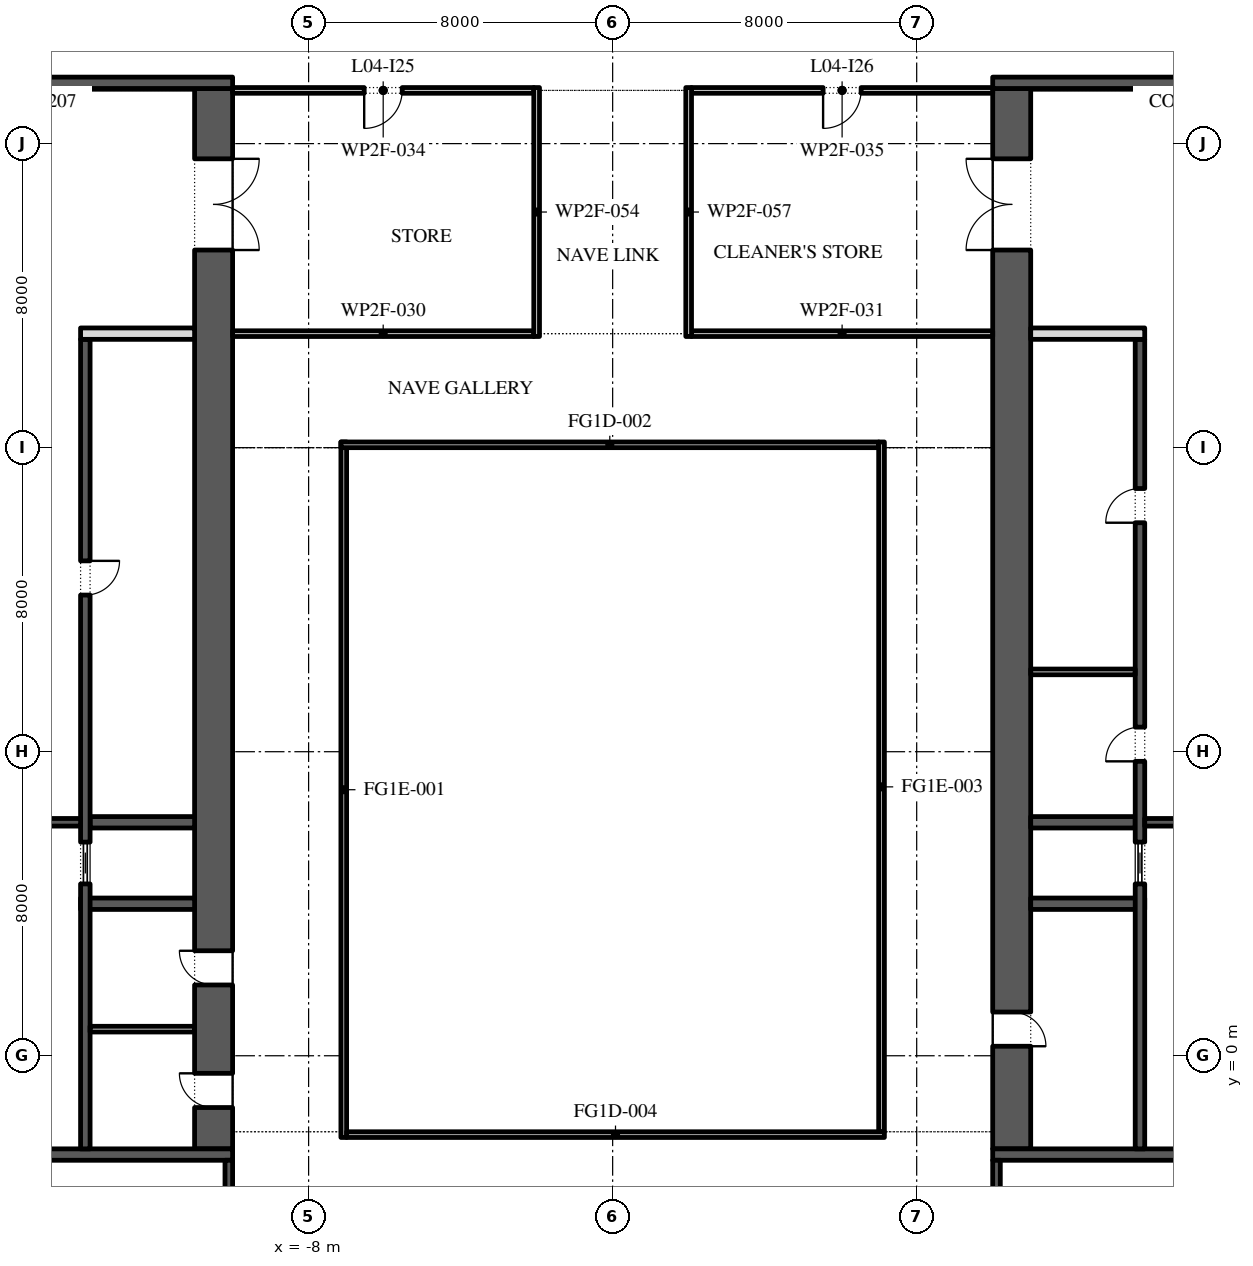
"""IFC4 building model, lengths in metres.
Left out: names, types, materials, properties, quantities, classifications, styles, units other than length and angle.
Written with IfcOpenShell. Run it as: python <this file> out.ifc"""

import sys

from ifc_helpers import new_model, si_unit, direction, frame, frame_2d, origin, place, context, subcontext, project, spatial, rectangle, extrude, element, fill, save


model = new_model("IFC4")
c1 = context("Model", 3, precision=1e-05, world=origin(), true_north=direction((0.0, 1.0)))
c2 = subcontext(c1, "Body", "Model", "MODEL_VIEW")
j1 = project(units=[si_unit("LENGTHUNIT", "METRE"), si_unit("PLANEANGLEUNIT", "RADIAN")], contexts=[c1])
p1 = place(None, origin())
s1 = spatial("IfcSite", under=j1, at=p1, CompositionType="ELEMENT")
p2 = place(p1, origin())
s2 = spatial("IfcBuilding", under=s1, at=p2, CompositionType="ELEMENT")
p3 = place(p2, frame((0.0, 0.0, 24.0)))
s3 = spatial("IfcBuildingStorey", under=s2, at=p3, CompositionType="ELEMENT", Elevation=24.0)
p4 = place(p3, frame((-7.075, -2.15, 0.0), z_axis=(0.0, 0.0, 1.0), x_axis=(0.0, 1.0, 0.0)))
e1 = element("IfcWall", 1, at=p4, inside=s3, PredefinedType="STANDARD", context=c2, shape_type="SweptSolid", body=[
    extrude(rectangle(XDim=18.3, YDim=0.15, at=frame_2d((9.15, 0.0))), origin(), (0.0, 0.0, 1.0), 4.5),
])
p5 = place(p3, frame((-7.15, 16.075, 0.0), z_axis=(0.0, 0.0, 1.0), x_axis=(1.0, 0.0, 0.0)))
e2 = element("IfcWall", 2, at=p5, inside=s3, PredefinedType="STANDARD", context=c2, shape_type="SweptSolid", body=[
    extrude(rectangle(XDim=14.15, YDim=0.15, at=frame_2d((7.075, 0.0))), origin(), (0.0, 0.0, 1.0), 3.52),
])
p6 = place(p3, frame((7.075, 16.15, 0.0), z_axis=(0.0, 0.0, 1.0), x_axis=(0.0, -1.0, 0.0)))
e3 = element("IfcWall", 3, at=p6, inside=s3, PredefinedType="STANDARD", context=c2, shape_type="SweptSolid", body=[
    extrude(rectangle(XDim=18.15, YDim=0.15, at=frame_2d((9.075, 0.0))), origin(), (0.0, 0.0, 1.0), 4.5),
])
p7 = place(p3, frame((7.15, -2.075, 0.0), z_axis=(0.0, 0.0, 1.0), x_axis=(-1.0, 0.0, 0.0)))
e4 = element("IfcWall", 4, at=p7, inside=s3, PredefinedType="STANDARD", context=c2, shape_type="SweptSolid", body=[
    extrude(rectangle(XDim=14.15, YDim=0.15, at=frame_2d((7.075, 0.0))), origin(), (0.0, 0.0, 1.0), 3.52),
])
p8 = place(p3, frame((-10.5, -2.45, 0.0), z_axis=(0.0, 0.0, 1.0), x_axis=(0.0, 1.0, 0.0)))
e5 = element("IfcWall", 5, at=p8, inside=s3, PredefinedType="SHEAR", context=c2, shape_type="SweptSolid", body=[
    extrude(rectangle(XDim=27.9, YDim=1.0, at=frame_2d((13.95, 0.0))), origin(), (0.0, 0.0, 1.0), 4.5),
])
p9 = place(p8, frame((23.65, 0.0, 0.0)))
e6 = element("IfcOpeningElement", 6, at=p9, cuts=e5, PredefinedType="OPENING", context=c2, shape_type="SweptSolid", body=[
    extrude(rectangle(XDim=2.4, YDim=2.1, at=frame_2d((1.2, 1.05))), frame((0.0, 0.51, 0.0), z_axis=(0.0, -1.0, 0.0), x_axis=(1.0, 0.0, 0.0)), (0.0, 0.0, 1.0), 1.02),
])
p10 = place(p8, frame((1.087, 0.0, 0.0)))
e7 = element("IfcOpeningElement", 7, at=p10, cuts=e5, PredefinedType="OPENING", context=c2, shape_type="SweptSolid", body=[
    extrude(rectangle(XDim=0.9, YDim=2.1, at=frame_2d((0.45, 1.05))), frame((0.0, 0.51, 0.0), z_axis=(0.0, -1.0, 0.0), x_axis=(1.0, 0.0, 0.0)), (0.0, 0.0, 1.0), 1.02),
])
p11 = place(p8, frame((4.312, 0.0, 0.0)))
e8 = element("IfcOpeningElement", 8, at=p11, cuts=e5, PredefinedType="OPENING", context=c2, shape_type="SweptSolid", body=[
    extrude(rectangle(XDim=0.9, YDim=2.1, at=frame_2d((0.45, 1.05))), frame((0.0, 0.51, 0.0), z_axis=(0.0, -1.0, 0.0), x_axis=(1.0, 0.0, 0.0)), (0.0, 0.0, 1.0), 1.02),
])
for number, where, z_axis, x_axis in (
    (9, (-22.0, -2.6, 0.0), (0.0, 0.0, 1.0), (1.0, 0.0, 0.0)),
    (10, (-22.0, 25.6, 0.0), (0.0, 0.0, 1.0), (1.0, 0.0, 0.0)),
):
    element("IfcWall", number, at=place(p3, frame(where, z_axis=z_axis, x_axis=x_axis)), inside=s3, PredefinedType="SHEAR", context=c2, shape_type="SweptSolid", body=[
        extrude(rectangle(XDim=12.0, YDim=0.3, at=frame_2d((6.0, 0.0))), origin(), (0.0, 0.0, 1.0), 4.5),
    ])
p12 = place(p3, frame((-14.0, 4.0, 0.0), z_axis=(0.0, 0.0, 1.0), x_axis=(1.0, 0.0, 0.0)))
e11 = element("IfcWall", 11, at=p12, inside=s3, PredefinedType="SHEAR", context=c2, shape_type="SweptSolid", body=[
    extrude(rectangle(XDim=3.0, YDim=0.3, at=frame_2d((1.5, 0.0))), origin(), (0.0, 0.0, 1.0), 4.5),
])
p13 = place(p3, frame((-13.75, 6.143, 0.0), z_axis=(0.0, 0.0, 1.0), x_axis=(1.0, 0.0, 0.0)))
e12 = element("IfcWall", 12, at=p13, inside=s3, PredefinedType="SHEAR", context=c2, shape_type="SweptSolid", body=[
    extrude(rectangle(XDim=2.75, YDim=0.3, at=frame_2d((1.375, 0.0))), origin(), (0.0, 0.0, 1.0), 4.5),
])
p14 = place(p3, frame((-13.875, -2.45, 0.0), z_axis=(0.0, 0.0, 1.0), x_axis=(0.0, 1.0, 0.0)))
e13 = element("IfcWall", 13, at=p14, inside=s3, PredefinedType="SHEAR", context=c2, shape_type="SweptSolid", body=[
    extrude(rectangle(XDim=21.3, YDim=0.25, at=frame_2d((10.65, 0.0))), origin(), (0.0, 0.0, 1.0), 4.5),
])
p15 = place(p14, frame((14.571, 0.0, 0.0)))
e14 = element("IfcOpeningElement", 14, at=p15, cuts=e13, PredefinedType="OPENING", context=c2, shape_type="SweptSolid", body=[
    extrude(rectangle(XDim=0.9, YDim=2.1, at=frame_2d((0.45, 1.05))), frame((0.0, 0.135, 0.0), z_axis=(0.0, -1.0, 0.0), x_axis=(1.0, 0.0, 0.0)), (0.0, 0.0, 1.0), 0.27),
])
p16 = place(p14, frame((6.971, 0.0, 0.0)))
e15 = element("IfcOpeningElement", 15, at=p16, cuts=e13, PredefinedType="OPENING", context=c2, shape_type="SweptSolid", body=[
    extrude(rectangle(XDim=1.1, YDim=2.1, at=frame_2d((0.55, 1.05))), frame((0.0, 0.135, 0.0), z_axis=(0.0, -1.0, 0.0), x_axis=(1.0, 0.0, 0.0)), (0.0, 0.0, 1.0), 0.27),
])
p17 = place(p3, frame((-14.0, 19.0, 0.0), z_axis=(0.0, 0.0, 1.0), x_axis=(1.0, 0.0, 0.0)))
e16 = element("IfcWall", 16, at=p17, inside=s3, PredefinedType="PARTITIONING", context=c2, shape_type="SweptSolid", body=[
    extrude(rectangle(XDim=3.0, YDim=0.3, at=frame_2d((1.5, 0.0))), origin(), (0.0, 0.0, 1.0), 4.5),
])
p18 = place(p3, frame((-18.0, 6.143, 0.0), z_axis=(0.0, 0.0, 1.0), x_axis=(1.0, 0.0, 0.0)))
e17 = element("IfcWall", 17, at=p18, inside=s3, PredefinedType="SHEAR", context=c2, shape_type="SweptSolid", body=[
    extrude(rectangle(XDim=4.0, YDim=0.2, at=frame_2d((2.0, 0.0))), origin(), (0.0, 0.0, 1.0), 4.5),
])
p19 = place(p18, frame((1.4, 0.0, 0.0)))
e18 = element("IfcOpeningElement", 18, at=p19, cuts=e17, PredefinedType="OPENING", context=c2, shape_type="SweptSolid", body=[
    extrude(rectangle(XDim=1.2, YDim=2.1, at=frame_2d((0.6, 1.05))), frame((0.0, 0.11, 0.0), z_axis=(0.0, -1.0, 0.0), x_axis=(1.0, 0.0, 0.0)), (0.0, 0.0, 1.0), 0.22),
])
p20 = place(p3, frame((-13.75, 0.7, 0.0), z_axis=(0.0, 0.0, 1.0), x_axis=(1.0, 0.0, 0.0)))
e19 = element("IfcWall", 19, at=p20, inside=s3, PredefinedType="PARTITIONING", context=c2, shape_type="SweptSolid", body=[
    extrude(rectangle(XDim=2.75, YDim=0.15, at=frame_2d((1.375, 0.0))), origin(), (0.0, 0.0, 1.0), 4.5),
])
p21 = place(p3, frame((-10.1, -15.8, 0.0), z_axis=(0.0, 0.0, 1.0), x_axis=(0.0, 1.0, 0.0)))
e20 = element("IfcWall", 20, at=p21, inside=s3, PredefinedType="SHEAR", context=c2, shape_type="SweptSolid", body=[
    extrude(rectangle(XDim=13.05, YDim=0.2, at=frame_2d((6.525, 0.0))), origin(), (0.0, 0.0, 1.0), 4.5),
])
p22 = place(p21, frame((2.762, 0.0, 0.0)))
e21 = element("IfcOpeningElement", 21, at=p22, cuts=e20, PredefinedType="OPENING", context=c2, shape_type="SweptSolid", body=[
    extrude(rectangle(XDim=0.9, YDim=2.1, at=frame_2d((0.45, 1.05))), frame((0.0, 0.11, 0.0), z_axis=(0.0, -1.0, 0.0), x_axis=(1.0, 0.0, 0.0)), (0.0, 0.0, 1.0), 0.22),
])
p23 = place(p21, frame((9.363, 0.0, 0.0)))
e22 = element("IfcOpeningElement", 22, at=p23, cuts=e20, PredefinedType="OPENING", context=c2, shape_type="SweptSolid", body=[
    extrude(rectangle(XDim=0.9, YDim=2.1, at=frame_2d((0.45, 1.05))), frame((0.0, 0.11, 0.0), z_axis=(0.0, -1.0, 0.0), x_axis=(1.0, 0.0, 0.0)), (0.0, 0.0, 1.0), 0.22),
])
p24 = place(p3, frame((10.5, -2.45, 0.0), z_axis=(0.0, 0.0, 1.0), x_axis=(0.0, 1.0, 0.0)))
e23 = element("IfcWall", 23, at=p24, inside=s3, PredefinedType="SHEAR", context=c2, shape_type="SweptSolid", body=[
    extrude(rectangle(XDim=27.9, YDim=1.0, at=frame_2d((13.95, 0.0))), origin(), (0.0, 0.0, 1.0), 4.5),
])
p25 = place(p24, frame((23.65, 0.0, 0.0)))
e24 = element("IfcOpeningElement", 24, at=p25, cuts=e23, PredefinedType="OPENING", context=c2, shape_type="SweptSolid", body=[
    extrude(rectangle(XDim=2.4, YDim=2.1, at=frame_2d((1.2, 1.05))), frame((0.0, 0.51, 0.0), z_axis=(0.0, -1.0, 0.0), x_axis=(1.0, 0.0, 0.0)), (0.0, 0.0, 1.0), 1.02),
])
p26 = place(p24, frame((2.7, 0.0, 0.0)))
e25 = element("IfcOpeningElement", 25, at=p26, cuts=e23, PredefinedType="OPENING", context=c2, shape_type="SweptSolid", body=[
    extrude(rectangle(XDim=0.9, YDim=2.1, at=frame_2d((0.45, 1.05))), frame((0.0, 0.51, 0.0), z_axis=(0.0, -1.0, 0.0), x_axis=(1.0, 0.0, 0.0)), (0.0, 0.0, 1.0), 1.02),
])
for number, where, z_axis, x_axis in (
    (26, (10.0, -2.6, 0.0), (0.0, 0.0, 1.0), (1.0, 0.0, 0.0)),
    (27, (10.0, 25.6, 0.0), (0.0, 0.0, 1.0), (1.0, 0.0, 0.0)),
):
    element("IfcWall", number, at=place(p3, frame(where, z_axis=z_axis, x_axis=x_axis)), inside=s3, PredefinedType="SHEAR", context=c2, shape_type="SweptSolid", body=[
        extrude(rectangle(XDim=12.0, YDim=0.3, at=frame_2d((6.0, 0.0))), origin(), (0.0, 0.0, 1.0), 4.5),
    ])
p27 = place(p3, frame((11.0, 4.0, 0.0), z_axis=(0.0, 0.0, 1.0), x_axis=(1.0, 0.0, 0.0)))
e28 = element("IfcWall", 28, at=p27, inside=s3, PredefinedType="SHEAR", context=c2, shape_type="SweptSolid", body=[
    extrude(rectangle(XDim=3.0, YDim=0.3, at=frame_2d((1.5, 0.0))), origin(), (0.0, 0.0, 1.0), 4.5),
])
p28 = place(p3, frame((11.0, 6.143, 0.0), z_axis=(0.0, 0.0, 1.0), x_axis=(1.0, 0.0, 0.0)))
e29 = element("IfcWall", 29, at=p28, inside=s3, PredefinedType="SHEAR", context=c2, shape_type="SweptSolid", body=[
    extrude(rectangle(XDim=2.75, YDim=0.3, at=frame_2d((1.375, 0.0))), origin(), (0.0, 0.0, 1.0), 4.5),
])
p29 = place(p3, frame((13.875, -2.45, 0.0), z_axis=(0.0, 0.0, 1.0), x_axis=(0.0, 1.0, 0.0)))
e30 = element("IfcWall", 30, at=p29, inside=s3, PredefinedType="SHEAR", context=c2, shape_type="SweptSolid", body=[
    extrude(rectangle(XDim=21.3, YDim=0.25, at=frame_2d((10.65, 0.0))), origin(), (0.0, 0.0, 1.0), 4.5),
])
p30 = place(p29, frame((10.196, 0.0, 0.0)))
e31 = element("IfcOpeningElement", 31, at=p30, cuts=e30, PredefinedType="OPENING", context=c2, shape_type="SweptSolid", body=[
    extrude(rectangle(XDim=0.9, YDim=2.1, at=frame_2d((0.45, 1.05))), frame((0.0, 0.135, 0.0), z_axis=(0.0, -1.0, 0.0), x_axis=(1.0, 0.0, 0.0)), (0.0, 0.0, 1.0), 0.27),
])
p31 = place(p29, frame((16.475, 0.0, 0.0)))
e32 = element("IfcOpeningElement", 32, at=p31, cuts=e30, PredefinedType="OPENING", context=c2, shape_type="SweptSolid", body=[
    extrude(rectangle(XDim=0.9, YDim=2.1, at=frame_2d((0.45, 1.05))), frame((0.0, 0.135, 0.0), z_axis=(0.0, -1.0, 0.0), x_axis=(1.0, 0.0, 0.0)), (0.0, 0.0, 1.0), 0.27),
])
p32 = place(p29, frame((6.971, 0.0, 0.0)))
e33 = element("IfcOpeningElement", 33, at=p32, cuts=e30, PredefinedType="OPENING", context=c2, shape_type="SweptSolid", body=[
    extrude(rectangle(XDim=1.1, YDim=2.1, at=frame_2d((0.55, 1.05))), frame((0.0, 0.135, 0.0), z_axis=(0.0, -1.0, 0.0), x_axis=(1.0, 0.0, 0.0)), (0.0, 0.0, 1.0), 0.27),
])
p33 = place(p3, frame((11.0, 19.0, 0.0), z_axis=(0.0, 0.0, 1.0), x_axis=(1.0, 0.0, 0.0)))
e34 = element("IfcWall", 34, at=p33, inside=s3, PredefinedType="PARTITIONING", context=c2, shape_type="SweptSolid", body=[
    extrude(rectangle(XDim=3.0, YDim=0.3, at=frame_2d((1.5, 0.0))), origin(), (0.0, 0.0, 1.0), 4.5),
])
p34 = place(p3, frame((11.0, 10.1, 0.0), z_axis=(0.0, 0.0, 1.0), x_axis=(1.0, 0.0, 0.0)))
e35 = element("IfcWall", 35, at=p34, inside=s3, PredefinedType="PARTITIONING", context=c2, shape_type="SweptSolid", body=[
    extrude(rectangle(XDim=2.75, YDim=0.15, at=frame_2d((1.375, 0.0))), origin(), (0.0, 0.0, 1.0), 4.5),
])
p35 = place(p3, frame((14.0, 6.143, 0.0), z_axis=(0.0, 0.0, 1.0), x_axis=(1.0, 0.0, 0.0)))
e36 = element("IfcWall", 36, at=p35, inside=s3, PredefinedType="SHEAR", context=c2, shape_type="SweptSolid", body=[
    extrude(rectangle(XDim=4.0, YDim=0.2, at=frame_2d((2.0, 0.0))), origin(), (0.0, 0.0, 1.0), 4.5),
])
p36 = place(p35, frame((1.4, 0.0, 0.0)))
e37 = element("IfcOpeningElement", 37, at=p36, cuts=e36, PredefinedType="OPENING", context=c2, shape_type="SweptSolid", body=[
    extrude(rectangle(XDim=1.2, YDim=2.1, at=frame_2d((0.6, 1.05))), frame((0.0, 0.11, 0.0), z_axis=(0.0, -1.0, 0.0), x_axis=(1.0, 0.0, 0.0)), (0.0, 0.0, 1.0), 0.22),
])
p37 = place(p3, frame((10.1, -15.8, 0.0), z_axis=(0.0, 0.0, 1.0), x_axis=(0.0, 1.0, 0.0)))
e38 = element("IfcWall", 38, at=p37, inside=s3, PredefinedType="SHEAR", context=c2, shape_type="SweptSolid", body=[
    extrude(rectangle(XDim=13.05, YDim=0.2, at=frame_2d((6.525, 0.0))), origin(), (0.0, 0.0, 1.0), 4.5),
])
p38 = place(p37, frame((4.462, 0.0, 0.0)))
e39 = element("IfcOpeningElement", 39, at=p38, cuts=e38, PredefinedType="OPENING", context=c2, shape_type="SweptSolid", body=[
    extrude(rectangle(XDim=0.9, YDim=2.1, at=frame_2d((0.45, 1.05))), frame((0.0, 0.11, 0.0), z_axis=(0.0, -1.0, 0.0), x_axis=(1.0, 0.0, 0.0)), (0.0, 0.0, 1.0), 0.22),
])
for number, where, z_axis, x_axis in (
    (40, (-10.0, 19.0, 0.0), (0.0, 0.0, 1.0), (1.0, 0.0, 0.0)),
    (41, (2.075, 19.0, 0.0), (0.0, 0.0, 1.0), (1.0, 0.0, 0.0)),
):
    element("IfcWall", number, at=place(p3, frame(where, z_axis=z_axis, x_axis=x_axis)), inside=s3, PredefinedType="PARTITIONING", context=c2, shape_type="SweptSolid", body=[
        extrude(rectangle(XDim=7.925, YDim=0.15, at=frame_2d((3.962, 0.0))), origin(), (0.0, 0.0, 1.0), 4.5),
    ])
p39 = place(p3, frame((-10.0, 25.4, 0.0), z_axis=(0.0, 0.0, 1.0), x_axis=(1.0, 0.0, 0.0)))
e42 = element("IfcWall", 42, at=p39, inside=s3, PredefinedType="PARTITIONING", context=c2, shape_type="SweptSolid", body=[
    extrude(rectangle(XDim=7.925, YDim=0.15, at=frame_2d((3.962, 0.0))), origin(), (0.0, 0.0, 1.0), 4.5),
])
p40 = place(p39, frame((3.462, 0.0, 0.0)))
e43 = element("IfcOpeningElement", 43, at=p40, cuts=e42, PredefinedType="OPENING", context=c2, shape_type="SweptSolid", body=[
    extrude(rectangle(XDim=1.0, YDim=2.1, at=frame_2d((0.5, 1.05))), frame((0.0, 0.085, 0.0), z_axis=(0.0, -1.0, 0.0), x_axis=(1.0, 0.0, 0.0)), (0.0, 0.0, 1.0), 0.17),
])
p41 = place(p3, frame((2.075, 25.4, 0.0), z_axis=(0.0, 0.0, 1.0), x_axis=(1.0, 0.0, 0.0)))
e44 = element("IfcWall", 44, at=p41, inside=s3, PredefinedType="PARTITIONING", context=c2, shape_type="SweptSolid", body=[
    extrude(rectangle(XDim=7.925, YDim=0.15, at=frame_2d((3.962, 0.0))), origin(), (0.0, 0.0, 1.0), 4.5),
])
p42 = place(p41, frame((3.462, 0.0, 0.0)))
e45 = element("IfcOpeningElement", 45, at=p42, cuts=e44, PredefinedType="OPENING", context=c2, shape_type="SweptSolid", body=[
    extrude(rectangle(XDim=1.0, YDim=2.1, at=frame_2d((0.5, 1.05))), frame((0.0, 0.085, 0.0), z_axis=(0.0, -1.0, 0.0), x_axis=(1.0, 0.0, 0.0)), (0.0, 0.0, 1.0), 0.17),
])
for number, where, z_axis, x_axis in (
    (46, (-2.0, 18.925, 0.0), (0.0, 0.0, 1.0), (0.0, 1.0, 0.0)),
    (47, (2.0, 18.925, 0.0), (0.0, 0.0, 1.0), (0.0, 1.0, 0.0)),
):
    element("IfcWall", number, at=place(p3, frame(where, z_axis=z_axis, x_axis=x_axis)), inside=s3, PredefinedType="PARTITIONING", context=c2, shape_type="SweptSolid", body=[
        extrude(rectangle(XDim=6.55, YDim=0.15, at=frame_2d((3.275, 0.0))), origin(), (0.0, 0.0, 1.0), 4.5),
    ])
p43 = place(p15, frame((0.9, -0.2, 0.0), z_axis=(0.0, 0.0, 1.0), x_axis=(-1.0, 0.0, 0.0)))
e48 = element("IfcDoor", 48, at=p43, inside=s3, OperationType="SINGLE_SWING_RIGHT", PredefinedType="DOOR", context=c2, shape_type="SweptSolid", body=[
    extrude(rectangle(XDim=0.9, YDim=2.1, at=frame_2d((0.45, 1.05))), frame((0.0, -0.075, 0.0), z_axis=(0.0, -1.0, 0.0), x_axis=(1.0, 0.0, 0.0)), (0.0, 0.0, 1.0), 0.05),
])
fill(e14, e48)
p44 = place(p16, origin())
e49 = element("IfcDoor", 49, at=p44, inside=s3, OperationType="SLIDING_TO_LEFT", PredefinedType="DOOR", context=c2, shape_type="SweptSolid", body=[
    extrude(rectangle(XDim=1.1, YDim=2.1, at=frame_2d((0.55, 1.05))), frame((0.0, 0.025, 0.0), z_axis=(0.0, -1.0, 0.0), x_axis=(1.0, 0.0, 0.0)), (0.0, 0.0, 1.0), 0.05),
])
fill(e15, e49)
p45 = place(p9, frame((2.4, 0.0, 0.0), z_axis=(0.0, 0.0, 1.0), x_axis=(-1.0, 0.0, 0.0)))
e50 = element("IfcDoor", 50, at=p45, inside=s3, OperationType="DOUBLE_DOOR_SINGLE_SWING", PredefinedType="DOOR", context=c2, shape_type="SweptSolid", body=[
    extrude(rectangle(XDim=2.4, YDim=2.1, at=frame_2d((1.2, 1.05))), frame((0.0, 0.025, 0.0), z_axis=(0.0, -1.0, 0.0), x_axis=(1.0, 0.0, 0.0)), (0.0, 0.0, 1.0), 0.05),
])
fill(e6, e50)
p46 = place(p10, origin())
e51 = element("IfcDoor", 51, at=p46, inside=s3, OperationType="SINGLE_SWING_LEFT", PredefinedType="DOOR", context=c2, shape_type="SweptSolid", body=[
    extrude(rectangle(XDim=0.9, YDim=2.1, at=frame_2d((0.45, 1.05))), frame((0.0, 0.5, 0.0), z_axis=(0.0, -1.0, 0.0), x_axis=(1.0, 0.0, 0.0)), (0.0, 0.0, 1.0), 0.05),
])
fill(e7, e51)
p47 = place(p11, origin())
e52 = element("IfcDoor", 52, at=p47, inside=s3, OperationType="SINGLE_SWING_LEFT", PredefinedType="DOOR", context=c2, shape_type="SweptSolid", body=[
    extrude(rectangle(XDim=0.9, YDim=2.1, at=frame_2d((0.45, 1.05))), frame((0.0, 0.5, 0.0), z_axis=(0.0, -1.0, 0.0), x_axis=(1.0, 0.0, 0.0)), (0.0, 0.0, 1.0), 0.05),
])
fill(e8, e52)
p48 = place(p30, origin())
e53 = element("IfcDoor", 53, at=p48, inside=s3, OperationType="SINGLE_SWING_RIGHT", PredefinedType="DOOR", context=c2, shape_type="SweptSolid", body=[
    extrude(rectangle(XDim=0.9, YDim=2.1, at=frame_2d((0.45, 1.05))), frame((0.0, 0.125, 0.0), z_axis=(0.0, -1.0, 0.0), x_axis=(1.0, 0.0, 0.0)), (0.0, 0.0, 1.0), 0.05),
])
fill(e31, e53)
p49 = place(p31, origin())
e54 = element("IfcDoor", 54, at=p49, inside=s3, OperationType="SINGLE_SWING_RIGHT", PredefinedType="DOOR", context=c2, shape_type="SweptSolid", body=[
    extrude(rectangle(XDim=0.9, YDim=2.1, at=frame_2d((0.45, 1.05))), frame((0.0, 0.125, 0.0), z_axis=(0.0, -1.0, 0.0), x_axis=(1.0, 0.0, 0.0)), (0.0, 0.0, 1.0), 0.05),
])
fill(e32, e54)
p50 = place(p32, origin())
e55 = element("IfcDoor", 55, at=p50, inside=s3, OperationType="SLIDING_TO_LEFT", PredefinedType="DOOR", context=c2, shape_type="SweptSolid", body=[
    extrude(rectangle(XDim=1.1, YDim=2.1, at=frame_2d((0.55, 1.05))), frame((0.0, 0.025, 0.0), z_axis=(0.0, -1.0, 0.0), x_axis=(1.0, 0.0, 0.0)), (0.0, 0.0, 1.0), 0.05),
])
fill(e33, e55)
p51 = place(p25, origin())
e56 = element("IfcDoor", 56, at=p51, inside=s3, OperationType="DOUBLE_DOOR_SINGLE_SWING", PredefinedType="DOOR", context=c2, shape_type="SweptSolid", body=[
    extrude(rectangle(XDim=2.4, YDim=2.1, at=frame_2d((1.2, 1.05))), frame((0.0, 0.025, 0.0), z_axis=(0.0, -1.0, 0.0), x_axis=(1.0, 0.0, 0.0)), (0.0, 0.0, 1.0), 0.05),
])
fill(e24, e56)
p52 = place(p26, frame((0.9, -0.95, 0.0), z_axis=(0.0, 0.0, 1.0), x_axis=(-1.0, 0.0, 0.0)))
e57 = element("IfcDoor", 57, at=p52, inside=s3, OperationType="SINGLE_SWING_LEFT", PredefinedType="DOOR", context=c2, shape_type="SweptSolid", body=[
    extrude(rectangle(XDim=0.9, YDim=2.1, at=frame_2d((0.45, 1.05))), frame((0.0, -0.45, 0.0), z_axis=(0.0, -1.0, 0.0), x_axis=(1.0, 0.0, 0.0)), (0.0, 0.0, 1.0), 0.05),
])
fill(e25, e57)
p53 = place(p40, frame((1.0, 0.0, 0.0), z_axis=(0.0, 0.0, 1.0), x_axis=(-1.0, 0.0, 0.0)))
e58 = element("IfcDoor", 58, at=p53, inside=s3, OperationType="SINGLE_SWING_LEFT", PredefinedType="DOOR", context=c2, shape_type="SweptSolid", body=[
    extrude(rectangle(XDim=1.0, YDim=2.1, at=frame_2d((0.5, 1.05))), frame((0.0, 0.025, 0.0), z_axis=(0.0, -1.0, 0.0), x_axis=(1.0, 0.0, 0.0)), (0.0, 0.0, 1.0), 0.05),
])
fill(e43, e58)
p54 = place(p42, frame((1.0, 0.0, 0.0), z_axis=(0.0, 0.0, 1.0), x_axis=(-1.0, 0.0, 0.0)))
e59 = element("IfcDoor", 59, at=p54, inside=s3, OperationType="SINGLE_SWING_LEFT", PredefinedType="DOOR", context=c2, shape_type="SweptSolid", body=[
    extrude(rectangle(XDim=1.0, YDim=2.1, at=frame_2d((0.5, 1.05))), frame((0.0, 0.025, 0.0), z_axis=(0.0, -1.0, 0.0), x_axis=(1.0, 0.0, 0.0)), (0.0, 0.0, 1.0), 0.05),
])
fill(e45, e59)
save(model, sys.argv[1])
